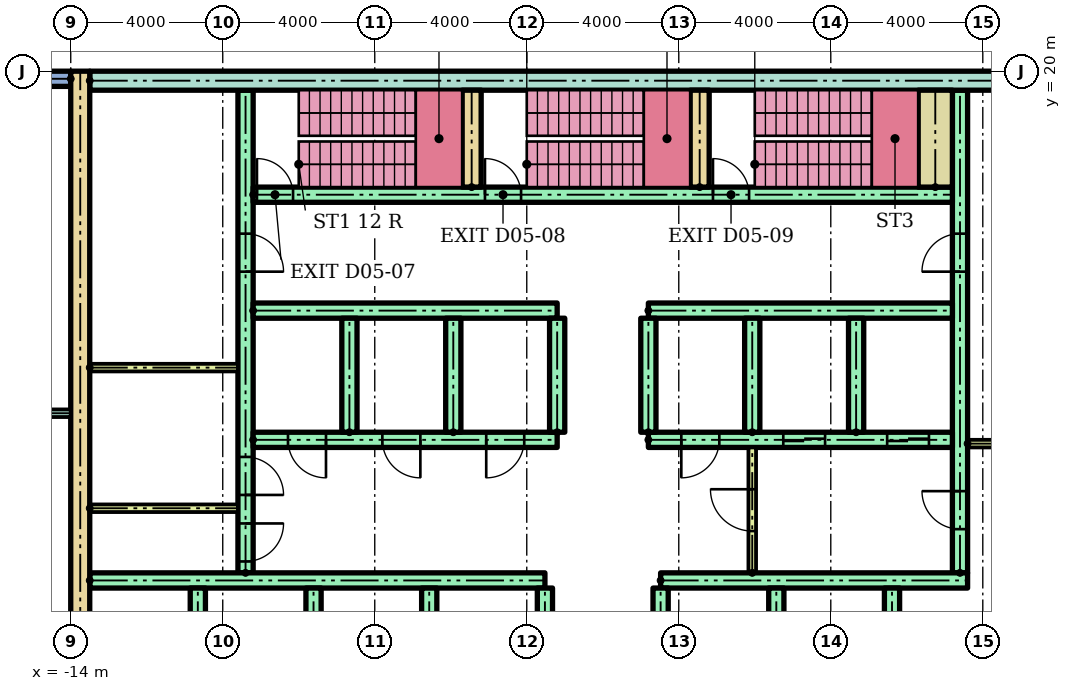
"""IFC4 building model, lengths in metres.
Left out: names, types, materials, properties, quantities, classifications, styles, units other than length and angle.
Written with IfcOpenShell. Run it as: python <this file> out.ifc"""

import sys

from ifc_helpers import new_model, si_unit, direction, frame, frame_2d, origin, place, context, subcontext, project, spatial, rectangle, extrude, element, fill, save


model = new_model("IFC4")
c1 = context("Model", 3, precision=1e-05, world=origin(), true_north=direction((0.0, 1.0)))
c2 = subcontext(c1, "Body", "Model", "MODEL_VIEW")
j1 = project(units=[si_unit("LENGTHUNIT", "METRE"), si_unit("PLANEANGLEUNIT", "RADIAN")], contexts=[c1])
p1 = place(None, origin())
s1 = spatial("IfcSite", under=j1, at=p1, CompositionType="ELEMENT")
p2 = place(p1, origin())
s2 = spatial("IfcBuilding", under=s1, at=p2, CompositionType="ELEMENT")
p3 = place(p2, frame((0.0, 0.0, 22.0)))
s3 = spatial("IfcBuildingStorey", under=s2, at=p3, CompositionType="ELEMENT", Elevation=22.0)
p4 = place(p3, frame((-14.0, 19.8, 0.0), z_axis=(0.0, 0.0, 1.0), x_axis=(-1.0, 0.0, 0.0)))
e1 = element("IfcWall", 1, at=p4, inside=s3, PredefinedType="STANDARD", context=c2, shape_type="SweptSolid", body=[
    extrude(rectangle(XDim=25.6, YDim=0.4, at=frame_2d((12.8, 0.0))), origin(), (0.0, 0.0, 1.0), 3.7),
])
p5 = place(p4, frame((0.8, 0.0, 0.9)))
e2 = element("IfcOpeningElement", 2, at=p5, cuts=e1, PredefinedType="OPENING", context=c2, shape_type="SweptSolid", body=[
    extrude(rectangle(XDim=2.4, YDim=2.1, at=frame_2d((1.2, 1.05))), frame((0.0, 0.21, 0.0), z_axis=(0.0, -1.0, 0.0), x_axis=(1.0, 0.0, 0.0)), (0.0, 0.0, 1.0), 0.42),
])
p6 = place(p4, frame((4.535, 0.0, 0.9)))
e3 = element("IfcOpeningElement", 3, at=p6, cuts=e1, PredefinedType="OPENING", context=c2, shape_type="SweptSolid", body=[
    extrude(rectangle(XDim=2.4, YDim=2.1, at=frame_2d((1.2, 1.05))), frame((0.0, 0.21, 0.0), z_axis=(0.0, -1.0, 0.0), x_axis=(1.0, 0.0, 0.0)), (0.0, 0.0, 1.0), 0.42),
])
p7 = place(p4, frame((12.535, 0.0, 0.9)))
e4 = element("IfcOpeningElement", 4, at=p7, cuts=e1, PredefinedType="OPENING", context=c2, shape_type="SweptSolid", body=[
    extrude(rectangle(XDim=2.4, YDim=2.1, at=frame_2d((1.2, 1.05))), frame((0.0, 0.21, 0.0), z_axis=(0.0, -1.0, 0.0), x_axis=(1.0, 0.0, 0.0)), (0.0, 0.0, 1.0), 0.42),
])
p8 = place(p4, frame((20.8, 0.0, 0.9)))
e5 = element("IfcOpeningElement", 5, at=p8, cuts=e1, PredefinedType="OPENING", context=c2, shape_type="SweptSolid", body=[
    extrude(rectangle(XDim=2.4, YDim=2.1, at=frame_2d((1.2, 1.05))), frame((0.0, 0.21, 0.0), z_axis=(0.0, -1.0, 0.0), x_axis=(1.0, 0.0, 0.0)), (0.0, 0.0, 1.0), 0.42),
])
p9 = place(p3, frame((-13.75, 3.0, 0.0), z_axis=(0.0, 0.0, 1.0), x_axis=(0.0, 1.0, 0.0)))
e6 = element("IfcWall", 6, at=p9, inside=s3, PredefinedType="SHEAR", context=c2, shape_type="SweptSolid", body=[
    extrude(rectangle(XDim=17.0, YDim=0.5, at=frame_2d((8.5, 0.0))), origin(), (0.0, 0.0, 1.0), 3.2),
])
p10 = place(p3, frame((-13.5, 19.75, 0.0)))
e7 = element("IfcWall", 7, at=p10, inside=s3, PredefinedType="SHEAR", context=c2, shape_type="SweptSolid", body=[
    extrude(rectangle(XDim=27.0, YDim=0.5, at=frame_2d((13.5, 0.0))), origin(), (0.0, 0.0, 1.0), 3.2),
])
p11 = place(p3, frame((-9.4, 6.8, 0.0), z_axis=(0.0, 0.0, 1.0), x_axis=(0.0, 1.0, 0.0)))
e8 = element("IfcWall", 8, at=p11, inside=s3, PredefinedType="SHEAR", context=c2, shape_type="SweptSolid", body=[
    extrude(rectangle(XDim=12.7, YDim=0.4, at=frame_2d((6.35, 0.0))), origin(), (0.0, 0.0, 1.0), 3.2),
])
p12 = place(p11, frame((0.3, 0.0, 0.0)))
e9 = element("IfcOpeningElement", 9, at=p12, cuts=e8, PredefinedType="OPENING", context=c2, shape_type="SweptSolid", body=[
    extrude(rectangle(XDim=1.0, YDim=2.1, at=frame_2d((0.5, 1.05))), frame((0.0, 0.21, 0.0), z_axis=(0.0, -1.0, 0.0), x_axis=(1.0, 0.0, 0.0)), (0.0, 0.0, 1.0), 0.42),
])
p13 = place(p11, frame((2.05, 0.0, 0.0)))
e10 = element("IfcOpeningElement", 10, at=p13, cuts=e8, PredefinedType="OPENING", context=c2, shape_type="SweptSolid", body=[
    extrude(rectangle(XDim=1.0, YDim=2.1, at=frame_2d((0.5, 1.05))), frame((0.0, 0.21, 0.0), z_axis=(0.0, -1.0, 0.0), x_axis=(1.0, 0.0, 0.0)), (0.0, 0.0, 1.0), 0.42),
])
p14 = place(p11, frame((7.925, 0.0, 0.0)))
e11 = element("IfcOpeningElement", 11, at=p14, cuts=e8, PredefinedType="OPENING", context=c2, shape_type="SweptSolid", body=[
    extrude(rectangle(XDim=1.0, YDim=2.1, at=frame_2d((0.5, 1.05))), frame((0.0, 0.21, 0.0), z_axis=(0.0, -1.0, 0.0), x_axis=(1.0, 0.0, 0.0)), (0.0, 0.0, 1.0), 0.42),
])
p15 = place(p3, frame((9.4, 6.8, 0.0), z_axis=(0.0, 0.0, 1.0), x_axis=(0.0, 1.0, 0.0)))
e12 = element("IfcWall", 12, at=p15, inside=s3, PredefinedType="SHEAR", context=c2, shape_type="SweptSolid", body=[
    extrude(rectangle(XDim=12.7, YDim=0.4, at=frame_2d((6.35, 0.0))), origin(), (0.0, 0.0, 1.0), 3.2),
])
p16 = place(p15, frame((1.15, 0.0, 0.0)))
e13 = element("IfcOpeningElement", 13, at=p16, cuts=e12, PredefinedType="OPENING", context=c2, shape_type="SweptSolid", body=[
    extrude(rectangle(XDim=1.0, YDim=2.1, at=frame_2d((0.5, 1.05))), frame((0.0, 0.21, 0.0), z_axis=(0.0, -1.0, 0.0), x_axis=(1.0, 0.0, 0.0)), (0.0, 0.0, 1.0), 0.42),
])
p17 = place(p15, frame((7.925, 0.0, 0.0)))
e14 = element("IfcOpeningElement", 14, at=p17, cuts=e12, PredefinedType="OPENING", context=c2, shape_type="SweptSolid", body=[
    extrude(rectangle(XDim=1.0, YDim=2.1, at=frame_2d((0.5, 1.05))), frame((0.0, 0.21, 0.0), z_axis=(0.0, -1.0, 0.0), x_axis=(1.0, 0.0, 0.0)), (0.0, 0.0, 1.0), 0.42),
])
p18 = place(p3, frame((-13.5, 6.6, 0.0)))
e15 = element("IfcWall", 15, at=p18, inside=s3, PredefinedType="SHEAR", context=c2, shape_type="SweptSolid", body=[
    extrude(rectangle(XDim=11.978, YDim=0.4, at=frame_2d((5.989, 0.0))), origin(), (0.0, 0.0, 1.0), 3.2),
])
p19 = place(p3, frame((1.522, 6.6, 0.0)))
e16 = element("IfcWall", 16, at=p19, inside=s3, PredefinedType="SHEAR", context=c2, shape_type="SweptSolid", body=[
    extrude(rectangle(XDim=8.078, YDim=0.4, at=frame_2d((4.039, 0.0))), origin(), (0.0, 0.0, 1.0), 3.2),
])
for number, where, z_axis, x_axis in (
    (17, (-10.656, 3.4, 0.0), (0.0, 0.0, 1.0), (0.0, 1.0, 0.0)),
    (18, (-7.611, 3.4, 0.0), (0.0, 0.0, 1.0), (0.0, 1.0, 0.0)),
    (19, (-4.567, 3.4, 0.0), (0.0, 0.0, 1.0), (0.0, 1.0, 0.0)),
    (20, (-1.522, 3.4, 0.0), (0.0, 0.0, 1.0), (0.0, 1.0, 0.0)),
    (21, (1.522, 3.4, 0.0), (0.0, 0.0, 1.0), (0.0, 1.0, 0.0)),
    (22, (4.567, 3.4, 0.0), (0.0, 0.0, 1.0), (0.0, 1.0, 0.0)),
    (23, (7.611, 3.4, 0.0), (0.0, 0.0, 1.0), (0.0, 1.0, 0.0)),
):
    element("IfcWall", number, at=place(p3, frame(where, z_axis=z_axis, x_axis=x_axis)), inside=s3, PredefinedType="SHEAR", context=c2, shape_type="SweptSolid", body=[
        extrude(rectangle(XDim=3.0, YDim=0.4, at=frame_2d((1.5, 0.0))), origin(), (0.0, 0.0, 1.0), 3.2),
    ])
p20 = place(p3, frame((-9.2, 10.3, 0.0)))
e24 = element("IfcWall", 24, at=p20, inside=s3, PredefinedType="SHEAR", context=c2, shape_type="SweptSolid", body=[
    extrude(rectangle(XDim=8.0, YDim=0.4, at=frame_2d((4.0, 0.0))), origin(), (0.0, 0.0, 1.0), 3.2),
])
p21 = place(p20, frame((0.917, 0.0, 0.0)))
e25 = element("IfcOpeningElement", 25, at=p21, cuts=e24, PredefinedType="OPENING", context=c2, shape_type="SweptSolid", body=[
    extrude(rectangle(XDim=1.0, YDim=2.1, at=frame_2d((0.5, 1.05))), frame((0.0, 0.21, 0.0), z_axis=(0.0, -1.0, 0.0), x_axis=(1.0, 0.0, 0.0)), (0.0, 0.0, 1.0), 0.42),
])
p22 = place(p20, frame((3.4, 0.0, 0.0)))
e26 = element("IfcOpeningElement", 26, at=p22, cuts=e24, PredefinedType="OPENING", context=c2, shape_type="SweptSolid", body=[
    extrude(rectangle(XDim=1.0, YDim=2.1, at=frame_2d((0.5, 1.05))), frame((0.0, 0.21, 0.0), z_axis=(0.0, -1.0, 0.0), x_axis=(1.0, 0.0, 0.0)), (0.0, 0.0, 1.0), 0.42),
])
p23 = place(p20, frame((6.133, 0.0, 0.0)))
e27 = element("IfcOpeningElement", 27, at=p23, cuts=e24, PredefinedType="OPENING", context=c2, shape_type="SweptSolid", body=[
    extrude(rectangle(XDim=1.0, YDim=2.1, at=frame_2d((0.5, 1.05))), frame((0.0, 0.21, 0.0), z_axis=(0.0, -1.0, 0.0), x_axis=(1.0, 0.0, 0.0)), (0.0, 0.0, 1.0), 0.42),
])
p24 = place(p3, frame((-9.2, 13.7, 0.0)))
e28 = element("IfcWall", 28, at=p24, inside=s3, PredefinedType="SHEAR", context=c2, shape_type="SweptSolid", body=[
    extrude(rectangle(XDim=8.0, YDim=0.4, at=frame_2d((4.0, 0.0))), origin(), (0.0, 0.0, 1.0), 3.2),
])
p25 = place(p3, frame((1.2, 10.3, 0.0)))
e29 = element("IfcWall", 29, at=p25, inside=s3, PredefinedType="SHEAR", context=c2, shape_type="SweptSolid", body=[
    extrude(rectangle(XDim=8.0, YDim=0.4, at=frame_2d((4.0, 0.0))), origin(), (0.0, 0.0, 1.0), 3.2),
])
p26 = place(p25, frame((3.55, 0.0, 0.0)))
e30 = element("IfcOpeningElement", 30, at=p26, cuts=e29, PredefinedType="OPENING", context=c2, shape_type="SweptSolid", body=[
    extrude(rectangle(XDim=1.1, YDim=2.1, at=frame_2d((0.55, 1.05))), frame((0.0, 0.21, 0.0), z_axis=(0.0, -1.0, 0.0), x_axis=(1.0, 0.0, 0.0)), (0.0, 0.0, 1.0), 0.42),
])
p27 = place(p25, frame((6.283, 0.0, 0.0)))
e31 = element("IfcOpeningElement", 31, at=p27, cuts=e29, PredefinedType="OPENING", context=c2, shape_type="SweptSolid", body=[
    extrude(rectangle(XDim=1.1, YDim=2.1, at=frame_2d((0.55, 1.05))), frame((0.0, 0.21, 0.0), z_axis=(0.0, -1.0, 0.0), x_axis=(1.0, 0.0, 0.0)), (0.0, 0.0, 1.0), 0.42),
])
p28 = place(p25, frame((0.867, 0.0, 0.0)))
e32 = element("IfcOpeningElement", 32, at=p28, cuts=e29, PredefinedType="OPENING", context=c2, shape_type="SweptSolid", body=[
    extrude(rectangle(XDim=1.0, YDim=2.1, at=frame_2d((0.5, 1.05))), frame((0.0, 0.21, 0.0), z_axis=(0.0, -1.0, 0.0), x_axis=(1.0, 0.0, 0.0)), (0.0, 0.0, 1.0), 0.42),
])
p29 = place(p3, frame((1.2, 13.7, 0.0)))
e33 = element("IfcWall", 33, at=p29, inside=s3, PredefinedType="SHEAR", context=c2, shape_type="SweptSolid", body=[
    extrude(rectangle(XDim=8.0, YDim=0.4, at=frame_2d((4.0, 0.0))), origin(), (0.0, 0.0, 1.0), 3.2),
])
for number, where, z_axis, x_axis in (
    (34, (-6.667, 10.5, 0.0), (0.0, 0.0, 1.0), (0.0, 1.0, 0.0)),
    (35, (-3.933, 10.5, 0.0), (0.0, 0.0, 1.0), (0.0, 1.0, 0.0)),
    (36, (-1.2, 10.5, 0.0), (0.0, 0.0, 1.0), (0.0, 1.0, 0.0)),
    (37, (1.2, 10.5, 0.0), (0.0, 0.0, 1.0), (0.0, 1.0, 0.0)),
    (38, (3.933, 10.5, 0.0), (0.0, 0.0, 1.0), (0.0, 1.0, 0.0)),
    (39, (6.667, 10.5, 0.0), (0.0, 0.0, 1.0), (0.0, 1.0, 0.0)),
):
    element("IfcWall", number, at=place(p3, frame(where, z_axis=z_axis, x_axis=x_axis)), inside=s3, PredefinedType="SHEAR", context=c2, shape_type="SweptSolid", body=[
        extrude(rectangle(XDim=3.0, YDim=0.4, at=frame_2d((1.5, 0.0))), origin(), (0.0, 0.0, 1.0), 3.2),
    ])
p30 = place(p3, frame((3.933, 6.8, 0.0), z_axis=(0.0, 0.0, 1.0), x_axis=(0.0, 1.0, 0.0)))
e40 = element("IfcWall", 40, at=p30, inside=s3, PredefinedType="PARTITIONING", context=c2, shape_type="SweptSolid", body=[
    extrude(rectangle(XDim=3.3, YDim=0.2, at=frame_2d((1.65, 0.0))), origin(), (0.0, 0.0, 1.0), 3.2),
])
p31 = place(p30, frame((1.1, 0.0, 0.0)))
e41 = element("IfcOpeningElement", 41, at=p31, cuts=e40, PredefinedType="OPENING", context=c2, shape_type="SweptSolid", body=[
    extrude(rectangle(XDim=1.1, YDim=2.1, at=frame_2d((0.55, 1.05))), frame((0.0, 0.11, 0.0), z_axis=(0.0, -1.0, 0.0), x_axis=(1.0, 0.0, 0.0)), (0.0, 0.0, 1.0), 0.22),
])
p32 = place(p3, frame((-9.2, 16.75, 0.0)))
e42 = element("IfcWall", 42, at=p32, inside=s3, PredefinedType="SHEAR", context=c2, shape_type="SweptSolid", body=[
    extrude(rectangle(XDim=18.4, YDim=0.4, at=frame_2d((9.2, 0.0))), origin(), (0.0, 0.0, 1.0), 3.2),
])
p33 = place(p32, frame((0.1, 0.0, 0.0)))
e43 = element("IfcOpeningElement", 43, at=p33, cuts=e42, PredefinedType="OPENING", context=c2, shape_type="SweptSolid", body=[
    extrude(rectangle(XDim=0.95, YDim=2.1, at=frame_2d((0.475, 1.05))), frame((0.0, 0.21, 0.0), z_axis=(0.0, -1.0, 0.0), x_axis=(1.0, 0.0, 0.0)), (0.0, 0.0, 1.0), 0.42),
])
p34 = place(p32, frame((6.1, 0.0, 0.0)))
e44 = element("IfcOpeningElement", 44, at=p34, cuts=e42, PredefinedType="OPENING", context=c2, shape_type="SweptSolid", body=[
    extrude(rectangle(XDim=0.95, YDim=2.1, at=frame_2d((0.475, 1.05))), frame((0.0, 0.21, 0.0), z_axis=(0.0, -1.0, 0.0), x_axis=(1.0, 0.0, 0.0)), (0.0, 0.0, 1.0), 0.42),
])
p35 = place(p32, frame((12.1, 0.0, 0.0)))
e45 = element("IfcOpeningElement", 45, at=p35, cuts=e42, PredefinedType="OPENING", context=c2, shape_type="SweptSolid", body=[
    extrude(rectangle(XDim=0.95, YDim=2.1, at=frame_2d((0.475, 1.05))), frame((0.0, 0.21, 0.0), z_axis=(0.0, -1.0, 0.0), x_axis=(1.0, 0.0, 0.0)), (0.0, 0.0, 1.0), 0.42),
])
for number, where, z_axis, x_axis in (
    (46, (-3.45, 16.95, 0.0), (0.0, 0.0, 1.0), (0.0, 1.0, 0.0)),
    (47, (2.55, 16.95, 0.0), (0.0, 0.0, 1.0), (0.0, 1.0, 0.0)),
):
    element("IfcWall", number, at=place(p3, frame(where, z_axis=z_axis, x_axis=x_axis)), inside=s3, PredefinedType="SHEAR", context=c2, shape_type="SweptSolid", body=[
        extrude(rectangle(XDim=2.55, YDim=0.5, at=frame_2d((1.275, 0.0))), origin(), (0.0, 0.0, 1.0), 3.2),
    ])
p36 = place(p3, frame((8.75, 16.95, 0.0), z_axis=(0.0, 0.0, 1.0), x_axis=(0.0, 1.0, 0.0)))
e48 = element("IfcWall", 48, at=p36, inside=s3, PredefinedType="SHEAR", context=c2, shape_type="SweptSolid", body=[
    extrude(rectangle(XDim=2.55, YDim=0.9, at=frame_2d((1.275, 0.0))), origin(), (0.0, 0.0, 1.0), 3.2),
])
for number, where in (
    (49, (-13.5, 8.5, 0.0)),
    (50, (-13.5, 12.2, 0.0)),
    (51, (9.6, 10.2, 0.0)),
):
    element("IfcWall", number, at=place(p3, frame(where)), inside=s3, PredefinedType="PARTITIONING", context=c2, shape_type="SweptSolid", body=[
        extrude(rectangle(XDim=3.9, YDim=0.2, at=frame_2d((1.95, 0.0))), origin(), (0.0, 0.0, 1.0), 3.2),
    ])
p37 = place(p3, frame((-21.5, 11.0, 0.0)))
e52 = element("IfcWall", 52, at=p37, inside=s3, PredefinedType="PARTITIONING", context=c2, shape_type="SweptSolid", body=[
    extrude(rectangle(XDim=7.5, YDim=0.2, at=frame_2d((3.75, 0.0))), origin(), (0.0, 0.0, 1.0), 3.2),
])
p38 = place(p37, frame((0.35, 0.0, 0.0)))
e53 = element("IfcOpeningElement", 53, at=p38, cuts=e52, PredefinedType="OPENING", context=c2, shape_type="SweptSolid", body=[
    extrude(rectangle(XDim=1.0, YDim=2.1, at=frame_2d((0.5, 1.05))), frame((0.0, 0.11, 0.0), z_axis=(0.0, -1.0, 0.0), x_axis=(1.0, 0.0, 0.0)), (0.0, 0.0, 1.0), 0.22),
])
p39 = place(p37, frame((4.36, 0.0, 0.0)))
e54 = element("IfcOpeningElement", 54, at=p39, cuts=e52, PredefinedType="OPENING", context=c2, shape_type="SweptSolid", body=[
    extrude(rectangle(XDim=1.0, YDim=2.1, at=frame_2d((0.5, 1.05))), frame((0.0, 0.11, 0.0), z_axis=(0.0, -1.0, 0.0), x_axis=(1.0, 0.0, 0.0)), (0.0, 0.0, 1.0), 0.22),
])
p40 = place(p26, origin())
e55 = element("IfcDoor", 55, at=p40, inside=s3, OperationType="SLIDING_TO_LEFT", PredefinedType="DOOR", context=c2, shape_type="SweptSolid", body=[
    extrude(rectangle(XDim=1.1, YDim=2.1, at=frame_2d((0.55, 1.05))), frame((0.0, 0.025, 0.0), z_axis=(0.0, -1.0, 0.0), x_axis=(1.0, 0.0, 0.0)), (0.0, 0.0, 1.0), 0.05),
])
fill(e30, e55)
p41 = place(p27, origin())
e56 = element("IfcDoor", 56, at=p41, inside=s3, OperationType="SLIDING_TO_LEFT", PredefinedType="DOOR", context=c2, shape_type="SweptSolid", body=[
    extrude(rectangle(XDim=1.1, YDim=2.1, at=frame_2d((0.55, 1.05))), frame((0.0, 0.025, 0.0), z_axis=(0.0, -1.0, 0.0), x_axis=(1.0, 0.0, 0.0)), (0.0, 0.0, 1.0), 0.05),
])
fill(e31, e56)
p42 = place(p21, frame((1.0, 0.0, 0.0), z_axis=(0.0, 0.0, 1.0), x_axis=(-1.0, 0.0, 0.0)))
e57 = element("IfcDoor", 57, at=p42, inside=s3, OperationType="SINGLE_SWING_RIGHT", PredefinedType="DOOR", context=c2, shape_type="SweptSolid", body=[
    extrude(rectangle(XDim=1.0, YDim=2.1, at=frame_2d((0.5, 1.05))), frame((0.0, 0.025, 0.0), z_axis=(0.0, -1.0, 0.0), x_axis=(1.0, 0.0, 0.0)), (0.0, 0.0, 1.0), 0.05),
])
fill(e25, e57)
p43 = place(p22, frame((1.0, 0.0, 0.0), z_axis=(0.0, 0.0, 1.0), x_axis=(-1.0, 0.0, 0.0)))
e58 = element("IfcDoor", 58, at=p43, inside=s3, OperationType="SINGLE_SWING_RIGHT", PredefinedType="DOOR", context=c2, shape_type="SweptSolid", body=[
    extrude(rectangle(XDim=1.0, YDim=2.1, at=frame_2d((0.5, 1.05))), frame((0.0, 0.025, 0.0), z_axis=(0.0, -1.0, 0.0), x_axis=(1.0, 0.0, 0.0)), (0.0, 0.0, 1.0), 0.05),
])
fill(e26, e58)
p44 = place(p23, frame((1.0, 0.0, 0.0), z_axis=(0.0, 0.0, 1.0), x_axis=(-1.0, 0.0, 0.0)))
e59 = element("IfcDoor", 59, at=p44, inside=s3, OperationType="SINGLE_SWING_LEFT", PredefinedType="DOOR", context=c2, shape_type="SweptSolid", body=[
    extrude(rectangle(XDim=1.0, YDim=2.1, at=frame_2d((0.5, 1.05))), frame((0.0, 0.025, 0.0), z_axis=(0.0, -1.0, 0.0), x_axis=(1.0, 0.0, 0.0)), (0.0, 0.0, 1.0), 0.05),
])
fill(e27, e59)
p45 = place(p28, frame((1.0, 0.0, 0.0), z_axis=(0.0, 0.0, 1.0), x_axis=(-1.0, 0.0, 0.0)))
e60 = element("IfcDoor", 60, at=p45, inside=s3, OperationType="SINGLE_SWING_LEFT", PredefinedType="DOOR", context=c2, shape_type="SweptSolid", body=[
    extrude(rectangle(XDim=1.0, YDim=2.1, at=frame_2d((0.5, 1.05))), frame((0.0, 0.025, 0.0), z_axis=(0.0, -1.0, 0.0), x_axis=(1.0, 0.0, 0.0)), (0.0, 0.0, 1.0), 0.05),
])
fill(e32, e60)
p46 = place(p31, origin())
e61 = element("IfcDoor", 61, at=p46, inside=s3, OperationType="SINGLE_SWING_RIGHT", PredefinedType="DOOR", context=c2, shape_type="SweptSolid", body=[
    extrude(rectangle(XDim=1.1, YDim=2.1, at=frame_2d((0.55, 1.05))), frame((0.0, 0.025, 0.0), z_axis=(0.0, -1.0, 0.0), x_axis=(1.0, 0.0, 0.0)), (0.0, 0.0, 1.0), 0.05),
])
fill(e41, e61)
p47 = place(p33, origin())
e62 = element("IfcDoor", 62, at=p47, inside=s3, OperationType="SINGLE_SWING_LEFT", PredefinedType="DOOR", context=c2, shape_type="SweptSolid", body=[
    extrude(rectangle(XDim=0.95, YDim=2.1, at=frame_2d((0.475, 1.05))), frame((0.0, 0.025, 0.0), z_axis=(0.0, -1.0, 0.0), x_axis=(1.0, 0.0, 0.0)), (0.0, 0.0, 1.0), 0.05),
])
fill(e43, e62)
p48 = place(p34, origin())
e63 = element("IfcDoor", 63, at=p48, inside=s3, OperationType="SINGLE_SWING_LEFT", PredefinedType="DOOR", context=c2, shape_type="SweptSolid", body=[
    extrude(rectangle(XDim=0.95, YDim=2.1, at=frame_2d((0.475, 1.05))), frame((0.0, 0.025, 0.0), z_axis=(0.0, -1.0, 0.0), x_axis=(1.0, 0.0, 0.0)), (0.0, 0.0, 1.0), 0.05),
])
fill(e44, e63)
p49 = place(p35, origin())
e64 = element("IfcDoor", 64, at=p49, inside=s3, OperationType="SINGLE_SWING_LEFT", PredefinedType="DOOR", context=c2, shape_type="SweptSolid", body=[
    extrude(rectangle(XDim=0.95, YDim=2.1, at=frame_2d((0.475, 1.05))), frame((0.0, 0.025, 0.0), z_axis=(0.0, -1.0, 0.0), x_axis=(1.0, 0.0, 0.0)), (0.0, 0.0, 1.0), 0.05),
])
fill(e45, e64)
p50 = place(p12, frame((1.0, 0.0, 0.0), z_axis=(0.0, 0.0, 1.0), x_axis=(-1.0, 0.0, 0.0)))
e65 = element("IfcDoor", 65, at=p50, inside=s3, OperationType="SINGLE_SWING_RIGHT", PredefinedType="DOOR", context=c2, shape_type="SweptSolid", body=[
    extrude(rectangle(XDim=1.0, YDim=2.1, at=frame_2d((0.5, 1.05))), frame((0.0, 0.025, 0.0), z_axis=(0.0, -1.0, 0.0), x_axis=(1.0, 0.0, 0.0)), (0.0, 0.0, 1.0), 0.05),
])
fill(e9, e65)
p51 = place(p13, frame((1.0, 0.0, 0.0), z_axis=(0.0, 0.0, 1.0), x_axis=(-1.0, 0.0, 0.0)))
e66 = element("IfcDoor", 66, at=p51, inside=s3, OperationType="SINGLE_SWING_LEFT", PredefinedType="DOOR", context=c2, shape_type="SweptSolid", body=[
    extrude(rectangle(XDim=1.0, YDim=2.1, at=frame_2d((0.5, 1.05))), frame((0.0, 0.025, 0.0), z_axis=(0.0, -1.0, 0.0), x_axis=(1.0, 0.0, 0.0)), (0.0, 0.0, 1.0), 0.05),
])
fill(e10, e66)
p52 = place(p14, frame((1.0, 0.0, 0.0), z_axis=(0.0, 0.0, 1.0), x_axis=(-1.0, 0.0, 0.0)))
e67 = element("IfcDoor", 67, at=p52, inside=s3, OperationType="SINGLE_SWING_LEFT", PredefinedType="DOOR", context=c2, shape_type="SweptSolid", body=[
    extrude(rectangle(XDim=1.0, YDim=2.1, at=frame_2d((0.5, 1.05))), frame((0.0, 0.025, 0.0), z_axis=(0.0, -1.0, 0.0), x_axis=(1.0, 0.0, 0.0)), (0.0, 0.0, 1.0), 0.05),
])
fill(e11, e67)
p53 = place(p16, origin())
e68 = element("IfcDoor", 68, at=p53, inside=s3, OperationType="SINGLE_SWING_RIGHT", PredefinedType="DOOR", context=c2, shape_type="SweptSolid", body=[
    extrude(rectangle(XDim=1.0, YDim=2.1, at=frame_2d((0.5, 1.05))), frame((0.0, 0.025, 0.0), z_axis=(0.0, -1.0, 0.0), x_axis=(1.0, 0.0, 0.0)), (0.0, 0.0, 1.0), 0.05),
])
fill(e13, e68)
p54 = place(p17, origin())
e69 = element("IfcDoor", 69, at=p54, inside=s3, OperationType="SINGLE_SWING_LEFT", PredefinedType="DOOR", context=c2, shape_type="SweptSolid", body=[
    extrude(rectangle(XDim=1.0, YDim=2.1, at=frame_2d((0.5, 1.05))), frame((0.0, 0.025, 0.0), z_axis=(0.0, -1.0, 0.0), x_axis=(1.0, 0.0, 0.0)), (0.0, 0.0, 1.0), 0.05),
])
fill(e14, e69)
save(model, sys.argv[1])
